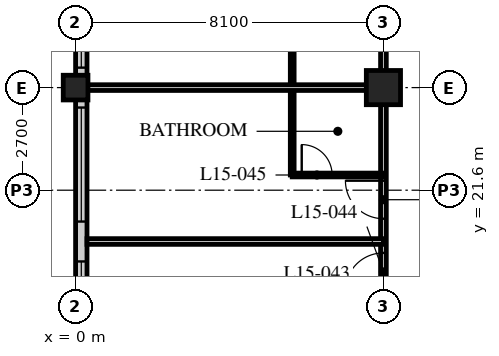
"""IFC4 building model, lengths in metres.
Left out: names, types, materials, properties, quantities, classifications, styles, units other than length and angle.
Written with IfcOpenShell. Run it as: python <this file> out.ifc"""

import sys

from ifc_helpers import new_model, si_unit, direction, frame, frame_2d, origin, origin_2d, place, context, subcontext, project, spatial, rectangle, hollow_rectangle, extrude, element, fill, save


model = new_model("IFC4")
c1 = context("Model", 3, precision=1e-05, world=origin(), true_north=direction((0.0, 1.0)))
c2 = subcontext(c1, "Body", "Model", "MODEL_VIEW")
j1 = project(units=[si_unit("LENGTHUNIT", "METRE"), si_unit("PLANEANGLEUNIT", "RADIAN")], contexts=[c1])
p1 = place(None, origin())
s1 = spatial("IfcSite", under=j1, at=p1, CompositionType="ELEMENT")
p2 = place(p1, origin())
s2 = spatial("IfcBuilding", under=s1, at=p2, CompositionType="ELEMENT")
p3 = place(p2, frame((0.0, 0.0, 63.6)))
s3 = spatial("IfcBuildingStorey", under=s2, at=p3, CompositionType="ELEMENT", Elevation=63.6)
p4 = place(p3, frame((0.0, 24.3, 0.0), z_axis=(0.0, 0.0, 1.0), x_axis=(1.0, 0.0, 0.0)))
e1 = element("IfcColumn", 1, at=p4, inside=s3, PredefinedType="COLUMN", context=c2, shape_type="SweptSolid", body=[
    extrude(hollow_rectangle(XDim=0.65, YDim=0.65, WallThickness=0.05, at=origin_2d()), origin(), (0.0, 0.0, 1.0), 3.4),
])
p5 = place(p3, frame((8.1, 24.3, 0.0), z_axis=(0.0, 0.0, 1.0), x_axis=(1.0, 0.0, 0.0)))
e2 = element("IfcColumn", 2, at=p5, inside=s3, PredefinedType="COLUMN", context=c2, shape_type="SweptSolid", body=[
    extrude(hollow_rectangle(XDim=0.9, YDim=0.9, WallThickness=0.09, at=origin_2d()), origin(), (0.0, 0.0, 1.0), 3.4),
])
p6 = place(p3, frame((0.15, 40.2, 0.0), z_axis=(0.0, 0.0, 1.0), x_axis=(0.0, -1.0, 0.0)))
e3 = element("IfcWall", 3, at=p6, inside=s3, PredefinedType="SOLIDWALL", context=c2, shape_type="SweptSolid", body=[
    extrude(rectangle(XDim=32.1, YDim=0.3, at=frame_2d((16.05, 0.0))), origin(), (0.0, 0.0, 1.0), 3.19),
])
p7 = place(p6, frame((0.225, 0.0, 0.9)))
e4 = element("IfcOpeningElement", 4, at=p7, cuts=e3, PredefinedType="OPENING", context=c2, shape_type="SweptSolid", body=[
    extrude(rectangle(XDim=3.0, YDim=2.0, at=frame_2d((1.5, 1.0))), frame((0.0, 0.16, 0.0), z_axis=(0.0, -1.0, 0.0), x_axis=(1.0, 0.0, 0.0)), (0.0, 0.0, 1.0), 0.32),
])
p8 = place(p6, frame((4.275, 0.0, 0.9)))
e5 = element("IfcOpeningElement", 5, at=p8, cuts=e3, PredefinedType="OPENING", context=c2, shape_type="SweptSolid", body=[
    extrude(rectangle(XDim=3.0, YDim=2.0, at=frame_2d((1.5, 1.0))), frame((0.0, 0.16, 0.0), z_axis=(0.0, -1.0, 0.0), x_axis=(1.0, 0.0, 0.0)), (0.0, 0.0, 1.0), 0.32),
])
p9 = place(p6, frame((8.325, 0.0, 0.9)))
e6 = element("IfcOpeningElement", 6, at=p9, cuts=e3, PredefinedType="OPENING", context=c2, shape_type="SweptSolid", body=[
    extrude(rectangle(XDim=3.0, YDim=2.0, at=frame_2d((1.5, 1.0))), frame((0.0, 0.16, 0.0), z_axis=(0.0, -1.0, 0.0), x_axis=(1.0, 0.0, 0.0)), (0.0, 0.0, 1.0), 0.32),
])
p10 = place(p6, frame((12.375, 0.0, 0.9)))
e7 = element("IfcOpeningElement", 7, at=p10, cuts=e3, PredefinedType="OPENING", context=c2, shape_type="SweptSolid", body=[
    extrude(rectangle(XDim=3.0, YDim=2.0, at=frame_2d((1.5, 1.0))), frame((0.0, 0.16, 0.0), z_axis=(0.0, -1.0, 0.0), x_axis=(1.0, 0.0, 0.0)), (0.0, 0.0, 1.0), 0.32),
])
p11 = place(p6, frame((16.425, 0.0, 0.9)))
e8 = element("IfcOpeningElement", 8, at=p11, cuts=e3, PredefinedType="OPENING", context=c2, shape_type="SweptSolid", body=[
    extrude(rectangle(XDim=3.0, YDim=2.0, at=frame_2d((1.5, 1.0))), frame((0.0, 0.16, 0.0), z_axis=(0.0, -1.0, 0.0), x_axis=(1.0, 0.0, 0.0)), (0.0, 0.0, 1.0), 0.32),
])
p12 = place(p6, frame((20.475, 0.0, 0.9)))
e9 = element("IfcOpeningElement", 9, at=p12, cuts=e3, PredefinedType="OPENING", context=c2, shape_type="SweptSolid", body=[
    extrude(rectangle(XDim=3.0, YDim=2.0, at=frame_2d((1.5, 1.0))), frame((0.0, 0.16, 0.0), z_axis=(0.0, -1.0, 0.0), x_axis=(1.0, 0.0, 0.0)), (0.0, 0.0, 1.0), 0.32),
])
p13 = place(p6, frame((24.525, 0.0, 0.9)))
e10 = element("IfcOpeningElement", 10, at=p13, cuts=e3, PredefinedType="OPENING", context=c2, shape_type="SweptSolid", body=[
    extrude(rectangle(XDim=3.0, YDim=2.0, at=frame_2d((1.5, 1.0))), frame((0.0, 0.16, 0.0), z_axis=(0.0, -1.0, 0.0), x_axis=(1.0, 0.0, 0.0)), (0.0, 0.0, 1.0), 0.32),
])
p14 = place(p6, frame((28.575, 0.0, 0.9)))
e11 = element("IfcOpeningElement", 11, at=p14, cuts=e3, PredefinedType="OPENING", context=c2, shape_type="SweptSolid", body=[
    extrude(rectangle(XDim=3.0, YDim=2.0, at=frame_2d((1.5, 1.0))), frame((0.0, 0.16, 0.0), z_axis=(0.0, -1.0, 0.0), x_axis=(1.0, 0.0, 0.0)), (0.0, 0.0, 1.0), 0.32),
])
p15 = place(p3, frame((8.1, 12.15, 0.0), z_axis=(0.0, 0.0, 1.0), x_axis=(0.0, 1.0, 0.0)))
e12 = element("IfcWall", 12, at=p15, inside=s3, PredefinedType="PARTITIONING", context=c2, shape_type="SweptSolid", body=[
    extrude(rectangle(XDim=30.15, YDim=0.15, at=frame_2d((15.075, 0.0))), origin(), (0.0, 0.0, 1.0), 2.578),
])
p16 = place(p15, frame((0.6, 0.0, 0.0)))
e13 = element("IfcOpeningElement", 13, at=p16, cuts=e12, PredefinedType="OPENING", context=c2, shape_type="SweptSolid", body=[
    extrude(rectangle(XDim=1.0, YDim=2.1, at=frame_2d((0.5, 1.05))), frame((0.0, 0.085, 0.0), z_axis=(0.0, -1.0, 0.0), x_axis=(1.0, 0.0, 0.0)), (0.0, 0.0, 1.0), 0.17),
])
p17 = place(p15, frame((6.8, 0.0, 0.0)))
e14 = element("IfcOpeningElement", 14, at=p17, cuts=e12, PredefinedType="OPENING", context=c2, shape_type="SweptSolid", body=[
    extrude(rectangle(XDim=1.0, YDim=2.1, at=frame_2d((0.5, 1.05))), frame((0.0, 0.085, 0.0), z_axis=(0.0, -1.0, 0.0), x_axis=(1.0, 0.0, 0.0)), (0.0, 0.0, 1.0), 0.17),
])
p18 = place(p15, frame((8.7, 0.0, 0.0)))
e15 = element("IfcOpeningElement", 15, at=p18, cuts=e12, PredefinedType="OPENING", context=c2, shape_type="SweptSolid", body=[
    extrude(rectangle(XDim=1.0, YDim=2.1, at=frame_2d((0.5, 1.05))), frame((0.0, 0.085, 0.0), z_axis=(0.0, -1.0, 0.0), x_axis=(1.0, 0.0, 0.0)), (0.0, 0.0, 1.0), 0.17),
])
p19 = place(p15, frame((14.6, 0.0, 0.0)))
e16 = element("IfcOpeningElement", 16, at=p19, cuts=e12, PredefinedType="OPENING", context=c2, shape_type="SweptSolid", body=[
    extrude(rectangle(XDim=1.0, YDim=2.1, at=frame_2d((0.5, 1.05))), frame((0.0, 0.085, 0.0), z_axis=(0.0, -1.0, 0.0), x_axis=(1.0, 0.0, 0.0)), (0.0, 0.0, 1.0), 0.17),
])
p20 = place(p15, frame((21.65, 0.0, 0.0)))
e17 = element("IfcOpeningElement", 17, at=p20, cuts=e12, PredefinedType="OPENING", context=c2, shape_type="SweptSolid", body=[
    extrude(rectangle(XDim=1.0, YDim=2.1, at=frame_2d((0.5, 1.05))), frame((0.0, 0.085, 0.0), z_axis=(0.0, -1.0, 0.0), x_axis=(1.0, 0.0, 0.0)), (0.0, 0.0, 1.0), 0.17),
])
p21 = place(p15, frame((26.75, 0.0, 0.0)))
e18 = element("IfcOpeningElement", 18, at=p21, cuts=e12, PredefinedType="OPENING", context=c2, shape_type="SweptSolid", body=[
    extrude(rectangle(XDim=1.0, YDim=2.1, at=frame_2d((0.5, 1.05))), frame((0.0, 0.085, 0.0), z_axis=(0.0, -1.0, 0.0), x_axis=(1.0, 0.0, 0.0)), (0.0, 0.0, 1.0), 0.17),
])
p22 = place(p3, frame((8.1, 20.25, 0.0), z_axis=(0.0, 0.0, 1.0), x_axis=(-1.0, 0.0, 0.0)))
e19 = element("IfcWall", 19, at=p22, inside=s3, PredefinedType="PARTITIONING", context=c2, shape_type="SweptSolid", body=[
    extrude(rectangle(XDim=7.8, YDim=0.15, at=frame_2d((3.9, 0.0))), origin(), (0.0, 0.0, 1.0), 3.19),
])
p23 = place(p3, frame((5.7, 22.0, 0.0), z_axis=(0.0, 0.0, 1.0), x_axis=(0.0, 1.0, 0.0)))
e20 = element("IfcWall", 20, at=p23, inside=s3, PredefinedType="PARTITIONING", context=c2, shape_type="SweptSolid", body=[
    extrude(rectangle(XDim=4.6, YDim=0.1, at=frame_2d((2.3, 0.0))), origin(), (0.0, 0.0, 1.0), 3.19),
])
p24 = place(p3, frame((8.1, 22.0, 0.0), z_axis=(0.0, 0.0, 1.0), x_axis=(-1.0, 0.0, 0.0)))
e21 = element("IfcWall", 21, at=p24, inside=s3, PredefinedType="PARTITIONING", context=c2, shape_type="SweptSolid", body=[
    extrude(rectangle(XDim=2.4, YDim=0.1, at=frame_2d((1.2, 0.0))), origin(), (0.0, 0.0, 1.0), 3.19),
])
p25 = place(p24, frame((1.35, 0.0, 0.0)))
e22 = element("IfcOpeningElement", 22, at=p25, cuts=e21, PredefinedType="OPENING", context=c2, shape_type="SweptSolid", body=[
    extrude(rectangle(XDim=0.8, YDim=2.1, at=frame_2d((0.4, 1.05))), frame((0.0, 0.06, 0.0), z_axis=(0.0, -1.0, 0.0), x_axis=(1.0, 0.0, 0.0)), (0.0, 0.0, 1.0), 0.12),
])
p26 = place(p3, frame((8.1, 24.3, 0.0), z_axis=(0.0, 0.0, 1.0), x_axis=(-1.0, 0.0, 0.0)))
e23 = element("IfcWall", 23, at=p26, inside=s3, PredefinedType="PARTITIONING", context=c2, shape_type="SweptSolid", body=[
    extrude(rectangle(XDim=7.8, YDim=0.15, at=frame_2d((3.9, 0.0))), origin(), (0.0, 0.0, 1.0), 2.578),
])
p27 = place(p10, origin())
e24 = element("IfcWindow", 24, at=p27, inside=s3, PartitioningType="SINGLE_PANEL", PredefinedType="WINDOW", context=c2, shape_type="SweptSolid", body=[
    extrude(rectangle(XDim=3.0, YDim=2.0, at=frame_2d((1.5, 1.0))), frame((0.0, 0.03, 0.0), z_axis=(0.0, -1.0, 0.0), x_axis=(1.0, 0.0, 0.0)), (0.0, 0.0, 1.0), 0.06),
])
fill(e7, e24)
p28 = place(p11, origin())
e25 = element("IfcWindow", 25, at=p28, inside=s3, PartitioningType="SINGLE_PANEL", PredefinedType="WINDOW", context=c2, shape_type="SweptSolid", body=[
    extrude(rectangle(XDim=3.0, YDim=2.0, at=frame_2d((1.5, 1.0))), frame((0.0, 0.03, 0.0), z_axis=(0.0, -1.0, 0.0), x_axis=(1.0, 0.0, 0.0)), (0.0, 0.0, 1.0), 0.06),
])
fill(e8, e25)
p29 = place(p12, origin())
e26 = element("IfcWindow", 26, at=p29, inside=s3, PartitioningType="SINGLE_PANEL", PredefinedType="WINDOW", context=c2, shape_type="SweptSolid", body=[
    extrude(rectangle(XDim=3.0, YDim=2.0, at=frame_2d((1.5, 1.0))), frame((0.0, 0.03, 0.0), z_axis=(0.0, -1.0, 0.0), x_axis=(1.0, 0.0, 0.0)), (0.0, 0.0, 1.0), 0.06),
])
fill(e9, e26)
p30 = place(p17, origin())
e27 = element("IfcDoor", 27, at=p30, inside=s3, OperationType="SINGLE_SWING_LEFT", PredefinedType="DOOR", context=c2, shape_type="SweptSolid", body=[
    extrude(rectangle(XDim=1.0, YDim=2.1, at=frame_2d((0.5, 1.05))), frame((0.0, 0.025, 0.0), z_axis=(0.0, -1.0, 0.0), x_axis=(1.0, 0.0, 0.0)), (0.0, 0.0, 1.0), 0.05),
])
fill(e14, e27)
p31 = place(p25, origin())
e28 = element("IfcDoor", 28, at=p31, inside=s3, OperationType="SINGLE_SWING_LEFT", PredefinedType="DOOR", context=c2, shape_type="SweptSolid", body=[
    extrude(rectangle(XDim=0.8, YDim=2.1, at=frame_2d((0.4, 1.05))), frame((0.0, 0.025, 0.0), z_axis=(0.0, -1.0, 0.0), x_axis=(1.0, 0.0, 0.0)), (0.0, 0.0, 1.0), 0.05),
])
fill(e22, e28)
p32 = place(p18, origin())
e29 = element("IfcDoor", 29, at=p32, inside=s3, OperationType="SINGLE_SWING_RIGHT", PredefinedType="DOOR", context=c2, shape_type="SweptSolid", body=[
    extrude(rectangle(XDim=1.0, YDim=2.1, at=frame_2d((0.5, 1.05))), frame((0.0, 0.025, 0.0), z_axis=(0.0, -1.0, 0.0), x_axis=(1.0, 0.0, 0.0)), (0.0, 0.0, 1.0), 0.05),
])
fill(e15, e29)
save(model, sys.argv[1])
